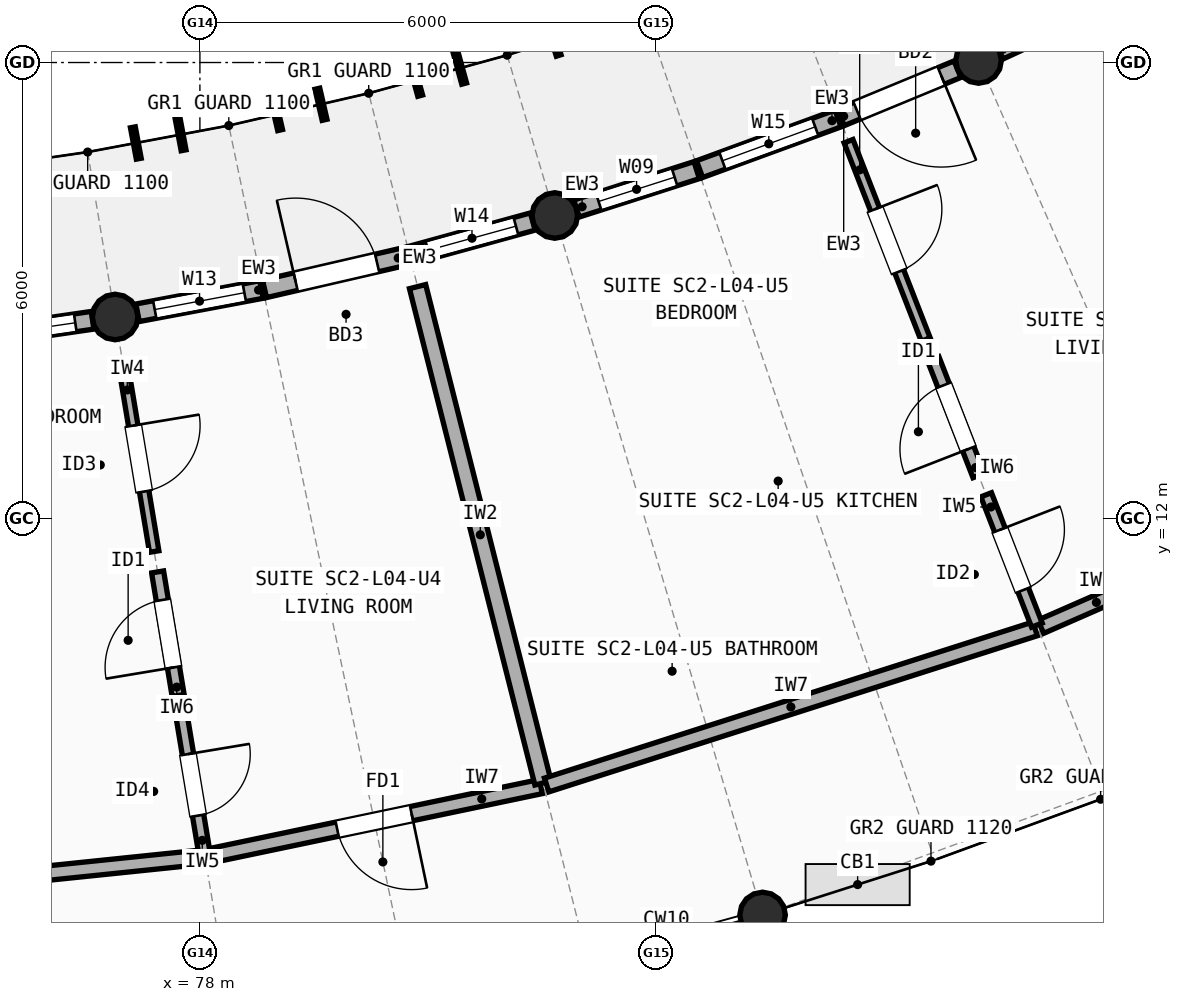
"""IFC4 building model, lengths in metres.
Left out: names, types, materials, properties, quantities, classifications, styles, units other than length and angle.
Written with IfcOpenShell. Run it as: python <this file> out.ifc"""

import sys

from ifc_helpers import new_model, si_unit, direction, frame, frame_2d, origin, origin_2d, place, context, subcontext, project, spatial, rectangle, circle, extrude, element, fill, save


model = new_model("IFC4")
c1 = context("Model", 3, precision=1e-05, world=origin(), true_north=direction((0.0, 1.0)))
c2 = subcontext(c1, "Body", "Model", "MODEL_VIEW")
j1 = project(units=[si_unit("LENGTHUNIT", "METRE"), si_unit("PLANEANGLEUNIT", "RADIAN")], contexts=[c1])
p1 = place(None, origin())
s1 = spatial("IfcSite", under=j1, at=p1, CompositionType="ELEMENT")
p2 = place(p1, origin())
s2 = spatial("IfcBuilding", under=s1, at=p2, CompositionType="ELEMENT")
p3 = place(p2, frame((0.0, 0.0, 14.1)))
s3 = spatial("IfcBuildingStorey", under=s2, at=p3, CompositionType="ELEMENT", Elevation=14.1)
for number, where, z_axis, x_axis in (
    (1, (76.885, 14.652, 0.0), (0.0, 0.0, 1.0), (1.0, 0.0, 0.0)),
    (2, (82.669, 15.988, 0.0), (0.0, 0.0, 1.0), (1.0, 0.0, 0.0)),
    (3, (85.403, 6.785, 0.0), (0.0, 0.0, 1.0), (1.0, 0.0, 0.0)),
    (4, (88.245, 18.027, 0.0), (0.0, 0.0, 1.0), (1.0, 0.0, 0.0)),
):
    element("IfcColumn", number, at=place(p3, frame(where, z_axis=z_axis, x_axis=x_axis)), inside=s3, PredefinedType="COLUMN", context=c2, shape_type="SweptSolid", body=[
        extrude(circle(Radius=0.3, at=origin_2d()), origin(), (0.0, 0.0, 1.0), 2.948),
    ])
p4 = place(p3, frame((74.945, 14.37, 0.0), z_axis=(0.0, 0.0, 1.0), x_axis=(0.989602429917, 0.14382986721, 0.0)))
e5 = element("IfcWall", 5, at=p4, inside=s3, PredefinedType="STANDARD", context=c2, shape_type="SweptSolid", body=[
    extrude(rectangle(XDim=1.66, YDim=0.235, at=frame_2d((0.83, 0.0))), origin(), (0.0, 0.0, 1.0), 2.684),
])
p5 = place(p4, frame((0.23, 0.0, 0.85)))
e6 = element("IfcOpeningElement", 6, at=p5, cuts=e5, PredefinedType="OPENING", context=c2, shape_type="SweptSolid", body=[
    extrude(rectangle(XDim=1.2, YDim=1.35, at=frame_2d((0.6, 0.675))), frame((0.0, 0.127, 0.0), z_axis=(0.0, -1.0, 0.0), x_axis=(1.0, 0.0, 0.0)), (0.0, 0.0, 1.0), 0.255),
])
p6 = place(p3, frame((77.179, 14.708, 0.0), z_axis=(0.0, 0.0, 1.0), x_axis=(0.982820537681, 0.184563784945, 0.0)))
e7 = element("IfcWall", 7, at=p6, inside=s3, PredefinedType="STANDARD", context=c2, shape_type="SweptSolid", body=[
    extrude(rectangle(XDim=1.66, YDim=0.235, at=frame_2d((0.83, 0.0))), origin(), (0.0, 0.0, 1.0), 2.684),
])
p7 = place(p6, frame((0.23, 0.0, 0.85)))
e8 = element("IfcOpeningElement", 8, at=p7, cuts=e7, PredefinedType="OPENING", context=c2, shape_type="SweptSolid", body=[
    extrude(rectangle(XDim=1.2, YDim=1.45, at=frame_2d((0.6, 0.725))), frame((0.0, 0.127, 0.0), z_axis=(0.0, -1.0, 0.0), x_axis=(1.0, 0.0, 0.0)), (0.0, 0.0, 1.0), 0.255),
])
p8 = place(p3, frame((78.85, 15.022, 0.0), z_axis=(0.0, 0.0, 1.0), x_axis=(0.974359373104, 0.224997360081, 0.0)))
e9 = element("IfcWall", 9, at=p8, inside=s3, PredefinedType="STANDARD", context=c2, shape_type="SweptSolid", body=[
    extrude(rectangle(XDim=1.94, YDim=0.235, at=frame_2d((0.97, 0.0))), origin(), (0.0, 0.0, 1.0), 2.684),
])
p9 = place(p8, frame((0.42, 0.0, 0.0)))
e10 = element("IfcOpeningElement", 10, at=p9, cuts=e9, PredefinedType="OPENING", context=c2, shape_type="SweptSolid", body=[
    extrude(rectangle(XDim=1.1, YDim=2.15, at=frame_2d((0.55, 1.075))), frame((0.0, 0.127, 0.0), z_axis=(0.0, -1.0, 0.0), x_axis=(1.0, 0.0, 0.0)), (0.0, 0.0, 1.0), 0.255),
])
p10 = place(p3, frame((80.779, 15.468, 0.0), z_axis=(0.0, 0.0, 1.0), x_axis=(0.964276805489, 0.264896663619, 0.0)))
e11 = element("IfcWall", 11, at=p10, inside=s3, PredefinedType="STANDARD", context=c2, shape_type="SweptSolid", body=[
    extrude(rectangle(XDim=1.66, YDim=0.235, at=frame_2d((0.83, 0.0))), origin(), (0.0, 0.0, 1.0), 2.684),
])
p11 = place(p10, frame((0.23, 0.0, 0.85)))
e12 = element("IfcOpeningElement", 12, at=p11, cuts=e11, PredefinedType="OPENING", context=c2, shape_type="SweptSolid", body=[
    extrude(rectangle(XDim=1.2, YDim=1.5, at=frame_2d((0.6, 0.75))), frame((0.0, 0.127, 0.0), z_axis=(0.0, -1.0, 0.0), x_axis=(1.0, 0.0, 0.0)), (0.0, 0.0, 1.0), 0.255),
])
p12 = place(p3, frame((82.955, 16.079, 0.0), z_axis=(0.0, 0.0, 1.0), x_axis=(0.952523149859, 0.304466170508, 0.0)))
e13 = element("IfcWall", 13, at=p12, inside=s3, PredefinedType="STANDARD", context=c2, shape_type="SweptSolid", body=[
    extrude(rectangle(XDim=1.66, YDim=0.235, at=frame_2d((0.83, 0.0))), origin(), (0.0, 0.0, 1.0), 2.684),
])
p13 = place(p12, frame((0.305, 0.0, 0.85)))
e14 = element("IfcOpeningElement", 14, at=p13, cuts=e13, PredefinedType="OPENING", context=c2, shape_type="SweptSolid", body=[
    extrude(rectangle(XDim=1.05, YDim=1.35, at=frame_2d((0.525, 0.675))), frame((0.0, 0.127, 0.0), z_axis=(0.0, -1.0, 0.0), x_axis=(1.0, 0.0, 0.0)), (0.0, 0.0, 1.0), 0.255),
])
p14 = place(p3, frame((84.574, 16.597, 0.0), z_axis=(0.0, 0.0, 1.0), x_axis=(0.939178301307, 0.343429932235, 0.0)))
e15 = element("IfcWall", 15, at=p14, inside=s3, PredefinedType="STANDARD", context=c2, shape_type="SweptSolid", body=[
    extrude(rectangle(XDim=1.94, YDim=0.235, at=frame_2d((0.97, 0.0))), origin(), (0.0, 0.0, 1.0), 2.684),
])
p15 = place(p14, frame((0.32, 0.0, 0.85)))
e16 = element("IfcOpeningElement", 16, at=p15, cuts=e15, PredefinedType="OPENING", context=c2, shape_type="SweptSolid", body=[
    extrude(rectangle(XDim=1.3, YDim=1.45, at=frame_2d((0.65, 0.725))), frame((0.0, 0.127, 0.0), z_axis=(0.0, -1.0, 0.0), x_axis=(1.0, 0.0, 0.0)), (0.0, 0.0, 1.0), 0.255),
])
p16 = place(p3, frame((86.433, 17.278, 0.0), z_axis=(0.0, 0.0, 1.0), x_axis=(0.924165494985, 0.38199232699, 0.0)))
e17 = element("IfcWall", 17, at=p16, inside=s3, PredefinedType="STANDARD", context=c2, shape_type="SweptSolid", body=[
    extrude(rectangle(XDim=1.66, YDim=0.235, at=frame_2d((0.83, 0.0))), origin(), (0.0, 0.0, 1.0), 2.684),
])
p17 = place(p16, frame((0.23, 0.0, 0.0)))
e18 = element("IfcOpeningElement", 18, at=p17, cuts=e17, PredefinedType="OPENING", context=c2, shape_type="SweptSolid", body=[
    extrude(rectangle(XDim=1.2, YDim=2.15, at=frame_2d((0.6, 1.075))), frame((0.0, 0.127, 0.0), z_axis=(0.0, -1.0, 0.0), x_axis=(1.0, 0.0, 0.0)), (0.0, 0.0, 1.0), 0.255),
])
p18 = place(p3, frame((88.517, 18.153, 0.0), z_axis=(0.0, 0.0, 1.0), x_axis=(0.907575902742, 0.419888057418, 0.0)))
e19 = element("IfcWall", 19, at=p18, inside=s3, PredefinedType="STANDARD", context=c2, shape_type="SweptSolid", body=[
    extrude(rectangle(XDim=1.66, YDim=0.235, at=frame_2d((0.83, 0.0))), origin(), (0.0, 0.0, 1.0), 2.684),
])
p19 = place(p18, frame((0.255, 0.0, 0.85)))
e20 = element("IfcOpeningElement", 20, at=p19, cuts=e19, PredefinedType="OPENING", context=c2, shape_type="SweptSolid", body=[
    extrude(rectangle(XDim=1.15, YDim=1.45, at=frame_2d((0.575, 0.725))), frame((0.0, 0.127, 0.0), z_axis=(0.0, -1.0, 0.0), x_axis=(1.0, 0.0, 0.0)), (0.0, 0.0, 1.0), 0.255),
])
p20 = place(p3, frame((71.316, 6.851, 0.0), z_axis=(0.0, 0.0, 1.0), x_axis=(0.994686939686, 0.10294606364, 0.0)))
e21 = element("IfcWall", 21, at=p20, inside=s3, PredefinedType="SOLIDWALL", context=c2, shape_type="SweptSolid", body=[
    extrude(rectangle(XDim=6.747, YDim=0.19, at=frame_2d((3.374, 0.0))), origin(), (0.0, 0.0, 1.0), 2.742),
])
p21 = place(p3, frame((78.107, 7.558, 0.0), z_axis=(0.0, 0.0, 1.0), x_axis=(0.978806148413, 0.204788973894, 0.0)))
e22 = element("IfcWall", 22, at=p21, inside=s3, PredefinedType="SOLIDWALL", context=c2, shape_type="SweptSolid", body=[
    extrude(rectangle(XDim=4.473, YDim=0.19, at=frame_2d((2.236, 0.0))), origin(), (0.0, 0.0, 1.0), 2.742),
])
p22 = place(p21, frame((1.737, 0.0, 0.0)))
e23 = element("IfcOpeningElement", 23, at=p22, cuts=e22, PredefinedType="OPENING", context=c2, shape_type="SweptSolid", body=[
    extrude(rectangle(XDim=1.0, YDim=2.15, at=frame_2d((0.5, 1.075))), frame((0.0, 0.105, 0.0), z_axis=(0.0, -1.0, 0.0), x_axis=(1.0, 0.0, 0.0)), (0.0, 0.0, 1.0), 0.21),
])
p23 = place(p3, frame((76.991, 14.013, 0.0), z_axis=(0.0, 0.0, 1.0), x_axis=(0.16420741421, -0.986425833562, 0.0)))
e24 = element("IfcWall", 24, at=p23, inside=s3, PredefinedType="PARTITIONING", context=c2, shape_type="SweptSolid", body=[
    extrude(rectangle(XDim=2.48, YDim=0.125, at=frame_2d((1.24, 0.0))), origin(), (0.0, 0.0, 1.0), 2.722),
])
p24 = place(p23, frame((0.8, 0.0, 0.0)))
e25 = element("IfcOpeningElement", 25, at=p24, cuts=e24, PredefinedType="OPENING", context=c2, shape_type="SweptSolid", body=[
    extrude(rectangle(XDim=0.88, YDim=2.1, at=frame_2d((0.44, 1.05))), frame((0.0, 0.073, 0.0), z_axis=(0.0, -1.0, 0.0), x_axis=(1.0, 0.0, 0.0)), (0.0, 0.0, 1.0), 0.145),
])
p25 = place(p3, frame((77.443, 11.298, 0.0), z_axis=(0.0, 0.0, 1.0), x_axis=(0.164158726706, -0.986433937193, 0.0)))
e26 = element("IfcWall", 26, at=p25, inside=s3, PredefinedType="PLUMBINGWALL", context=c2, shape_type="SweptSolid", body=[
    extrude(rectangle(XDim=1.648, YDim=0.16, at=frame_2d((0.824, 0.0))), origin(), (0.0, 0.0, 1.0), 2.722),
])
p26 = place(p25, frame((0.374, 0.0, 0.0)))
e27 = element("IfcOpeningElement", 27, at=p26, cuts=e26, PredefinedType="OPENING", context=c2, shape_type="SweptSolid", body=[
    extrude(rectangle(XDim=0.9, YDim=2.1, at=frame_2d((0.45, 1.05))), frame((0.0, 0.09, 0.0), z_axis=(0.0, -1.0, 0.0), x_axis=(1.0, 0.0, 0.0)), (0.0, 0.0, 1.0), 0.18),
])
p27 = place(p3, frame((77.759, 9.404, 0.0), z_axis=(0.0, 0.0, 1.0), x_axis=(0.164269882379, -0.986415432636, 0.0)))
e28 = element("IfcWall", 28, at=p27, inside=s3, PredefinedType="PARTITIONING", context=c2, shape_type="SweptSolid", body=[
    extrude(rectangle(XDim=1.84, YDim=0.15, at=frame_2d((0.92, 0.0))), origin(), (0.0, 0.0, 1.0), 2.722),
])
p28 = place(p27, frame((0.51, 0.0, 0.0)))
e29 = element("IfcOpeningElement", 29, at=p28, cuts=e28, PredefinedType="OPENING", context=c2, shape_type="SweptSolid", body=[
    extrude(rectangle(XDim=0.82, YDim=2.08, at=frame_2d((0.41, 1.04))), frame((0.0, 0.085, 0.0), z_axis=(0.0, -1.0, 0.0), x_axis=(1.0, 0.0, 0.0)), (0.0, 0.0, 1.0), 0.17),
])
p29 = place(p3, frame((80.864, 15.052, 0.0), z_axis=(0.0, 0.0, 1.0), x_axis=(0.244982481903, -0.969527505314, 0.0)))
e30 = element("IfcWall", 30, at=p29, inside=s3, PredefinedType="SOLIDWALL", context=c2, shape_type="SweptSolid", body=[
    extrude(rectangle(XDim=6.736, YDim=0.22, at=frame_2d((3.368, 0.0))), origin(), (0.0, 0.0, 1.0), 2.762),
])
p30 = place(p3, frame((82.562, 8.495, 0.0), z_axis=(0.0, 0.0, 1.0), x_axis=(0.952529122406, 0.304447484746, 0.0)))
e31 = element("IfcWall", 31, at=p30, inside=s3, PredefinedType="SOLIDWALL", context=c2, shape_type="SweptSolid", body=[
    extrude(rectangle(XDim=6.747, YDim=0.19, at=frame_2d((3.374, 0.0))), origin(), (0.0, 0.0, 1.0), 2.722),
])
p31 = place(p3, frame((89.064, 10.577, 0.0), z_axis=(0.0, 0.0, 1.0), x_axis=(0.91610596958, 0.40093621999, 0.0)))
e32 = element("IfcWall", 32, at=p31, inside=s3, PredefinedType="SOLIDWALL", context=c2, shape_type="SweptSolid", body=[
    extrude(rectangle(XDim=4.473, YDim=0.19, at=frame_2d((2.237, 0.0))), origin(), (0.0, 0.0, 1.0), 2.722),
])
p32 = place(p31, frame((1.747, 0.0, 0.0)))
e33 = element("IfcOpeningElement", 33, at=p32, cuts=e32, PredefinedType="OPENING", context=c2, shape_type="SweptSolid", body=[
    extrude(rectangle(XDim=0.98, YDim=2.15, at=frame_2d((0.49, 1.075))), frame((0.0, 0.105, 0.0), z_axis=(0.0, -1.0, 0.0), x_axis=(1.0, 0.0, 0.0)), (0.0, 0.0, 1.0), 0.21),
])
p33 = place(p3, frame((86.534, 16.965, 0.0), z_axis=(0.0, 0.0, 1.0), x_axis=(0.362896442288, -0.93182947591, 0.0)))
e34 = element("IfcWall", 34, at=p33, inside=s3, PredefinedType="PARTITIONING", context=c2, shape_type="SweptSolid", body=[
    extrude(rectangle(XDim=2.8, YDim=0.125, at=frame_2d((1.4, 0.0))), origin(), (0.0, 0.0, 1.0), 2.762),
])
p34 = place(p33, frame((0.96, 0.0, 0.0)))
e35 = element("IfcOpeningElement", 35, at=p34, cuts=e34, PredefinedType="OPENING", context=c2, shape_type="SweptSolid", body=[
    extrude(rectangle(XDim=0.88, YDim=2.1, at=frame_2d((0.44, 1.05))), frame((0.0, 0.073, 0.0), z_axis=(0.0, -1.0, 0.0), x_axis=(1.0, 0.0, 0.0)), (0.0, 0.0, 1.0), 0.145),
])
p35 = place(p3, frame((87.648, 14.102, 0.0), z_axis=(0.0, 0.0, 1.0), x_axis=(0.362817996081, -0.9318600226, 0.0)))
e36 = element("IfcWall", 36, at=p35, inside=s3, PredefinedType="PLUMBINGWALL", context=c2, shape_type="SweptSolid", body=[
    extrude(rectangle(XDim=1.648, YDim=0.16, at=frame_2d((0.824, 0.0))), origin(), (0.0, 0.0, 1.0), 2.762),
])
p36 = place(p35, frame((0.374, 0.0, 0.0)))
e37 = element("IfcOpeningElement", 37, at=p36, cuts=e36, PredefinedType="OPENING", context=c2, shape_type="SweptSolid", body=[
    extrude(rectangle(XDim=0.9, YDim=2.1, at=frame_2d((0.45, 1.05))), frame((0.0, 0.09, 0.0), z_axis=(0.0, -1.0, 0.0), x_axis=(1.0, 0.0, 0.0)), (0.0, 0.0, 1.0), 0.18),
])
p37 = place(p3, frame((88.345, 12.313, 0.0), z_axis=(0.0, 0.0, 1.0), x_axis=(0.362772804225, -0.931877616705, 0.0)))
e38 = element("IfcWall", 38, at=p37, inside=s3, PredefinedType="PARTITIONING", context=c2, shape_type="SweptSolid", body=[
    extrude(rectangle(XDim=1.84, YDim=0.15, at=frame_2d((0.92, 0.0))), origin(), (0.0, 0.0, 1.0), 2.762),
])
p38 = place(p37, frame((0.495, 0.0, 0.0)))
e39 = element("IfcOpeningElement", 39, at=p38, cuts=e38, PredefinedType="OPENING", context=c2, shape_type="SweptSolid", body=[
    extrude(rectangle(XDim=0.85, YDim=2.1, at=frame_2d((0.425, 1.05))), frame((0.0, 0.085, 0.0), z_axis=(0.0, -1.0, 0.0), x_axis=(1.0, 0.0, 0.0)), (0.0, 0.0, 1.0), 0.17),
])
p39 = place(p5, origin())
e40 = element("IfcWindow", 40, at=p39, inside=s3, PartitioningType="SINGLE_PANEL", PredefinedType="WINDOW", context=c2, shape_type="SweptSolid", body=[
    extrude(rectangle(XDim=1.2, YDim=1.35, at=frame_2d((0.6, 0.675))), frame((0.0, 0.03, 0.0), z_axis=(0.0, -1.0, 0.0), x_axis=(1.0, 0.0, 0.0)), (0.0, 0.0, 1.0), 0.06),
])
fill(e6, e40)
p40 = place(p7, origin())
e41 = element("IfcWindow", 41, at=p40, inside=s3, PartitioningType="SINGLE_PANEL", PredefinedType="WINDOW", context=c2, shape_type="SweptSolid", body=[
    extrude(rectangle(XDim=1.2, YDim=1.45, at=frame_2d((0.6, 0.725))), frame((0.0, 0.03, 0.0), z_axis=(0.0, -1.0, 0.0), x_axis=(1.0, 0.0, 0.0)), (0.0, 0.0, 1.0), 0.06),
])
fill(e8, e41)
p41 = place(p9, origin())
e42 = element("IfcDoor", 42, at=p41, inside=s3, OperationType="SINGLE_SWING_LEFT", PredefinedType="DOOR", context=c2, shape_type="SweptSolid", body=[
    extrude(rectangle(XDim=1.1, YDim=2.15, at=frame_2d((0.55, 1.075))), frame((0.0, 0.025, 0.0), z_axis=(0.0, -1.0, 0.0), x_axis=(1.0, 0.0, 0.0)), (0.0, 0.0, 1.0), 0.05),
])
fill(e10, e42)
p42 = place(p11, origin())
e43 = element("IfcWindow", 43, at=p42, inside=s3, PartitioningType="SINGLE_PANEL", PredefinedType="WINDOW", context=c2, shape_type="SweptSolid", body=[
    extrude(rectangle(XDim=1.2, YDim=1.5, at=frame_2d((0.6, 0.75))), frame((0.0, 0.03, 0.0), z_axis=(0.0, -1.0, 0.0), x_axis=(1.0, 0.0, 0.0)), (0.0, 0.0, 1.0), 0.06),
])
fill(e12, e43)
p43 = place(p13, origin())
e44 = element("IfcWindow", 44, at=p43, inside=s3, PartitioningType="SINGLE_PANEL", PredefinedType="WINDOW", context=c2, shape_type="SweptSolid", body=[
    extrude(rectangle(XDim=1.05, YDim=1.35, at=frame_2d((0.525, 0.675))), frame((0.0, 0.03, 0.0), z_axis=(0.0, -1.0, 0.0), x_axis=(1.0, 0.0, 0.0)), (0.0, 0.0, 1.0), 0.06),
])
fill(e14, e44)
p44 = place(p15, origin())
e45 = element("IfcWindow", 45, at=p44, inside=s3, PartitioningType="SINGLE_PANEL", PredefinedType="WINDOW", context=c2, shape_type="SweptSolid", body=[
    extrude(rectangle(XDim=1.3, YDim=1.45, at=frame_2d((0.65, 0.725))), frame((0.0, 0.03, 0.0), z_axis=(0.0, -1.0, 0.0), x_axis=(1.0, 0.0, 0.0)), (0.0, 0.0, 1.0), 0.06),
])
fill(e16, e45)
p45 = place(p17, origin())
e46 = element("IfcDoor", 46, at=p45, inside=s3, OperationType="SINGLE_SWING_RIGHT", PredefinedType="DOOR", context=c2, shape_type="SweptSolid", body=[
    extrude(rectangle(XDim=1.2, YDim=2.15, at=frame_2d((0.6, 1.075))), frame((0.0, 0.025, 0.0), z_axis=(0.0, -1.0, 0.0), x_axis=(1.0, 0.0, 0.0)), (0.0, 0.0, 1.0), 0.05),
])
fill(e18, e46)
p46 = place(p22, origin())
e47 = element("IfcDoor", 47, at=p46, inside=s3, OperationType="SINGLE_SWING_RIGHT", PredefinedType="DOOR", context=c2, shape_type="SweptSolid", body=[
    extrude(rectangle(XDim=1.0, YDim=2.15, at=frame_2d((0.5, 1.075))), frame((0.0, 0.025, 0.0), z_axis=(0.0, -1.0, 0.0), x_axis=(1.0, 0.0, 0.0)), (0.0, 0.0, 1.0), 0.05),
])
fill(e23, e47)
p47 = place(p24, origin())
e48 = element("IfcDoor", 48, at=p47, inside=s3, OperationType="SINGLE_SWING_LEFT", PredefinedType="DOOR", context=c2, shape_type="SweptSolid", body=[
    extrude(rectangle(XDim=0.88, YDim=2.1, at=frame_2d((0.44, 1.05))), frame((0.0, 0.025, 0.0), z_axis=(0.0, -1.0, 0.0), x_axis=(1.0, 0.0, 0.0)), (0.0, 0.0, 1.0), 0.05),
])
fill(e25, e48)
p48 = place(p26, origin())
e49 = element("IfcDoor", 49, at=p48, inside=s3, OperationType="SINGLE_SWING_RIGHT", PredefinedType="DOOR", context=c2, shape_type="SweptSolid", body=[
    extrude(rectangle(XDim=0.9, YDim=2.1, at=frame_2d((0.45, 1.05))), frame((0.0, 0.025, 0.0), z_axis=(0.0, -1.0, 0.0), x_axis=(1.0, 0.0, 0.0)), (0.0, 0.0, 1.0), 0.05),
])
fill(e27, e49)
p49 = place(p28, origin())
e50 = element("IfcDoor", 50, at=p49, inside=s3, OperationType="SINGLE_SWING_LEFT", PredefinedType="DOOR", context=c2, shape_type="SweptSolid", body=[
    extrude(rectangle(XDim=0.82, YDim=2.08, at=frame_2d((0.41, 1.04))), frame((0.0, 0.025, 0.0), z_axis=(0.0, -1.0, 0.0), x_axis=(1.0, 0.0, 0.0)), (0.0, 0.0, 1.0), 0.05),
])
fill(e29, e50)
p50 = place(p34, origin())
e51 = element("IfcDoor", 51, at=p50, inside=s3, OperationType="SINGLE_SWING_LEFT", PredefinedType="DOOR", context=c2, shape_type="SweptSolid", body=[
    extrude(rectangle(XDim=0.88, YDim=2.1, at=frame_2d((0.44, 1.05))), frame((0.0, 0.025, 0.0), z_axis=(0.0, -1.0, 0.0), x_axis=(1.0, 0.0, 0.0)), (0.0, 0.0, 1.0), 0.05),
])
fill(e35, e51)
p51 = place(p36, origin())
e52 = element("IfcDoor", 52, at=p51, inside=s3, OperationType="SINGLE_SWING_RIGHT", PredefinedType="DOOR", context=c2, shape_type="SweptSolid", body=[
    extrude(rectangle(XDim=0.9, YDim=2.1, at=frame_2d((0.45, 1.05))), frame((0.0, 0.025, 0.0), z_axis=(0.0, -1.0, 0.0), x_axis=(1.0, 0.0, 0.0)), (0.0, 0.0, 1.0), 0.05),
])
fill(e37, e52)
p52 = place(p38, origin())
e53 = element("IfcDoor", 53, at=p52, inside=s3, OperationType="SINGLE_SWING_LEFT", PredefinedType="DOOR", context=c2, shape_type="SweptSolid", body=[
    extrude(rectangle(XDim=0.85, YDim=2.1, at=frame_2d((0.425, 1.05))), frame((0.0, 0.025, 0.0), z_axis=(0.0, -1.0, 0.0), x_axis=(1.0, 0.0, 0.0)), (0.0, 0.0, 1.0), 0.05),
])
fill(e39, e53)
save(model, sys.argv[1])
